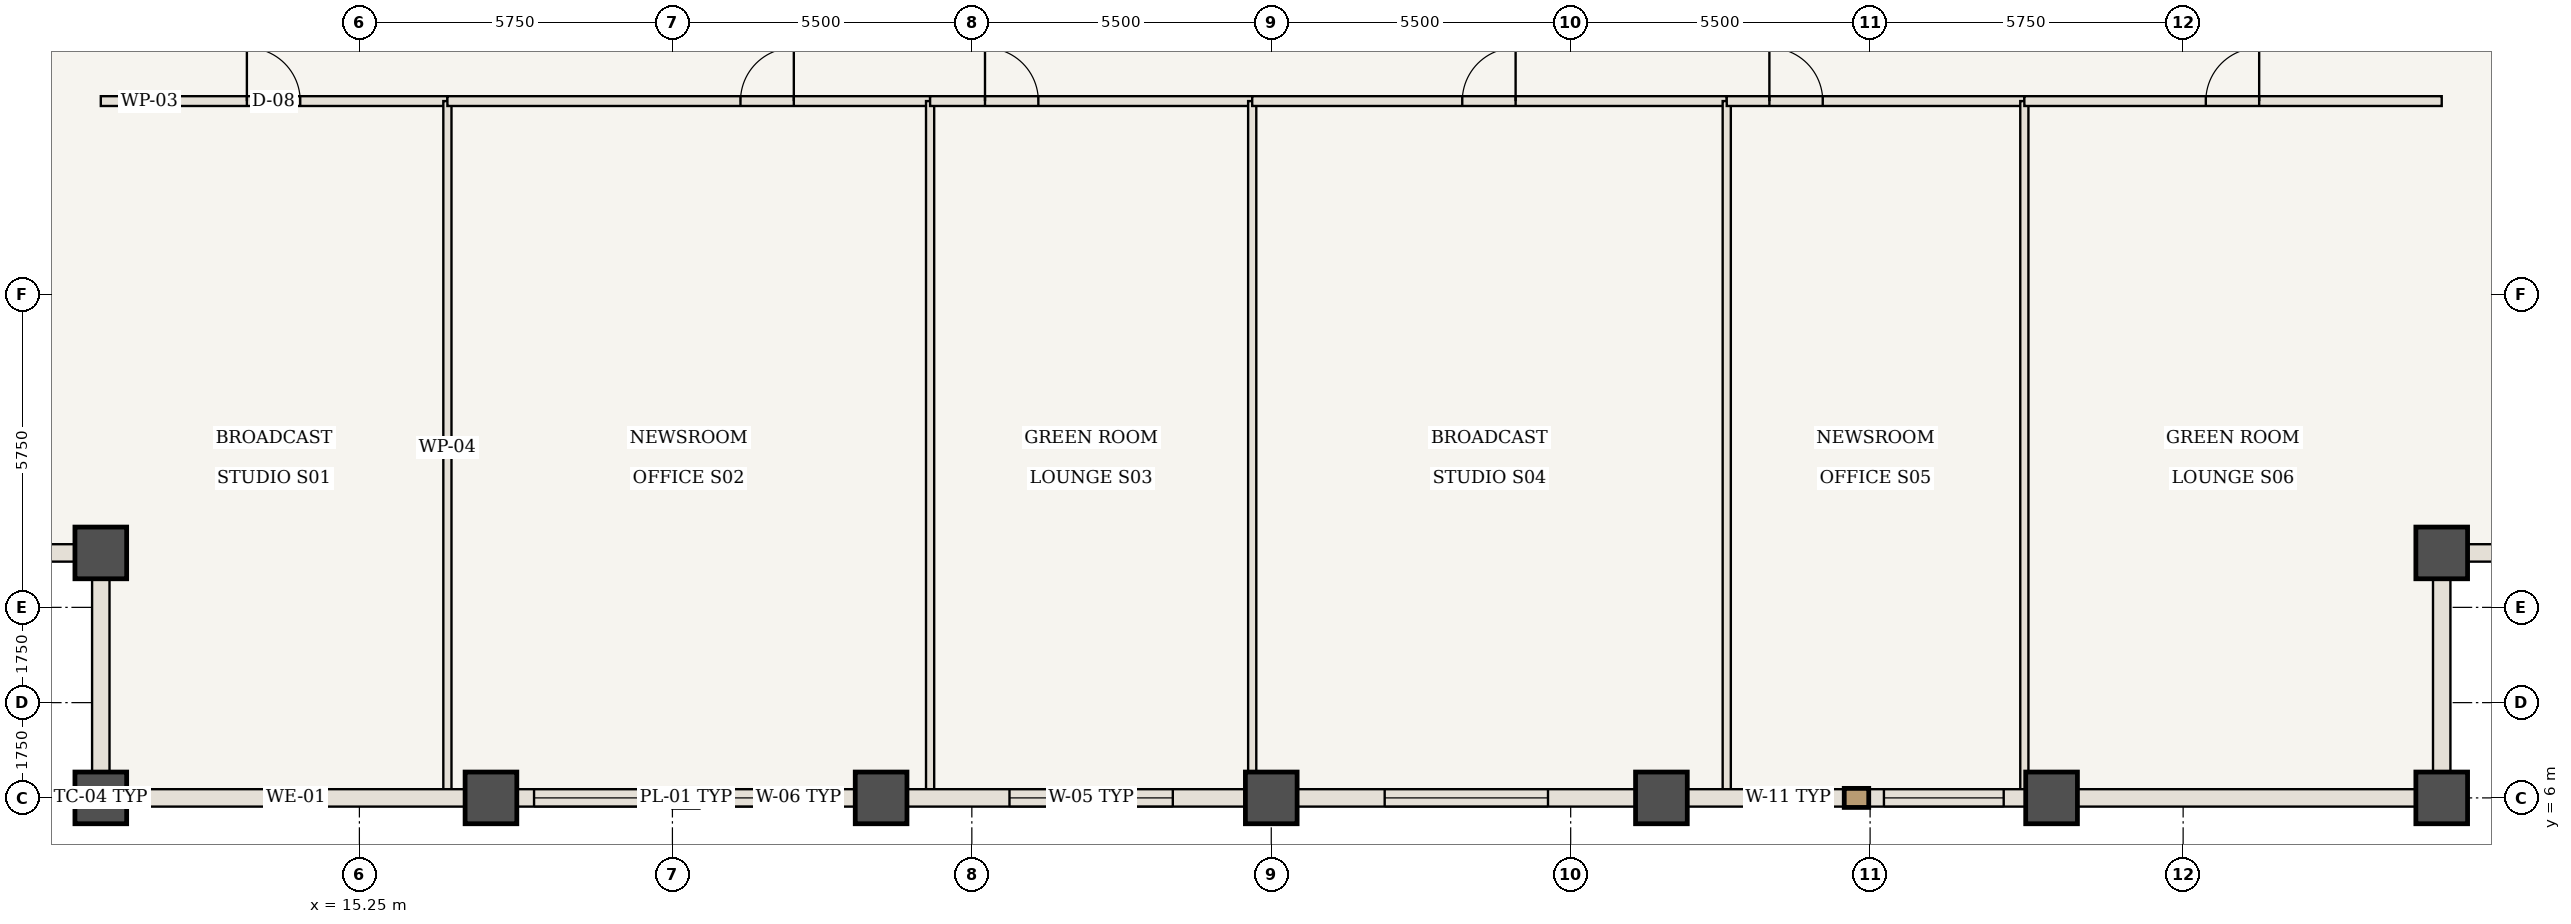
"""IFC4 building model, lengths in metres.
Left out: names, types, materials, properties, quantities, classifications, styles, units other than length and angle.
Written with IfcOpenShell. Run it as: python <this file> out.ifc"""

import sys

from ifc_helpers import new_model, si_unit, direction, frame, frame_2d, origin, origin_2d, place, context, subcontext, project, spatial, rectangle, extrude, element, fill, save


model = new_model("IFC4")
c1 = context("Model", 3, precision=1e-05, world=origin(), true_north=direction((0.0, 1.0)))
c2 = subcontext(c1, "Body", "Model", "MODEL_VIEW")
j1 = project(units=[si_unit("LENGTHUNIT", "METRE"), si_unit("PLANEANGLEUNIT", "RADIAN")], contexts=[c1])
p1 = place(None, origin())
s1 = spatial("IfcSite", under=j1, at=p1, CompositionType="ELEMENT")
p2 = place(p1, origin())
s2 = spatial("IfcBuilding", under=s1, at=p2, CompositionType="ELEMENT")
p3 = place(p2, frame((0.0, 0.0, 164.5)))
s3 = spatial("IfcBuildingStorey", under=s2, at=p3, CompositionType="ELEMENT", Elevation=164.5)
for number, where, z_axis, x_axis in (
    (1, (10.5, 6.0, 0.0), (0.0, 0.0, 1.0), (1.0, 0.0, 0.0)),
    (2, (10.5, 10.5, 0.0), (0.0, 0.0, 1.0), (1.0, 0.0, 0.0)),
    (3, (53.5, 6.0, 0.0), (0.0, 0.0, 1.0), (1.0, 0.0, 0.0)),
    (4, (53.5, 10.5, 0.0), (0.0, 0.0, 1.0), (1.0, 0.0, 0.0)),
    (5, (17.667, 6.0, 0.0), (0.0, 0.0, 1.0), (1.0, 0.0, 0.0)),
    (6, (24.833, 6.0, 0.0), (0.0, 0.0, 1.0), (1.0, 0.0, 0.0)),
    (7, (32.0, 6.0, 0.0), (0.0, 0.0, 1.0), (1.0, 0.0, 0.0)),
    (8, (39.167, 6.0, 0.0), (0.0, 0.0, 1.0), (1.0, 0.0, 0.0)),
    (9, (46.333, 6.0, 0.0), (0.0, 0.0, 1.0), (1.0, 0.0, 0.0)),
):
    element("IfcColumn", number, at=place(p3, frame(where, z_axis=z_axis, x_axis=x_axis)), inside=s3, PredefinedType="COLUMN", context=c2, shape_type="SweptSolid", body=[
        extrude(rectangle(XDim=0.95, YDim=0.95, at=origin_2d()), origin(), (0.0, 0.0, 1.0), 3.85),
    ])
p4 = place(p3, frame((10.5, 18.8, 0.0), z_axis=(0.0, 0.0, 1.0), x_axis=(1.0, 0.0, 0.0)))
e10 = element("IfcWall", 10, at=p4, inside=s3, PredefinedType="STANDARD", context=c2, shape_type="SweptSolid", body=[
    extrude(rectangle(XDim=6.367, YDim=0.18, at=frame_2d((3.183, 0.0))), origin(), (0.0, 0.0, 1.0), 3.685),
])
p5 = place(p4, frame((2.683, 0.0, 0.0)))
e11 = element("IfcOpeningElement", 11, at=p5, cuts=e10, PredefinedType="OPENING", context=c2, shape_type="SweptSolid", body=[
    extrude(rectangle(XDim=0.98, YDim=2.2, at=frame_2d((0.49, 1.1))), frame((0.0, 0.1, 0.0), z_axis=(0.0, -1.0, 0.0), x_axis=(1.0, 0.0, 0.0)), (0.0, 0.0, 1.0), 0.2),
])
p6 = place(p3, frame((16.867, 6.06, 0.0), z_axis=(0.0, 0.0, 1.0), x_axis=(0.0, 1.0, 0.0)))
e12 = element("IfcWall", 12, at=p6, inside=s3, PredefinedType="STANDARD", context=c2, shape_type="SweptSolid", body=[
    extrude(rectangle(XDim=12.74, YDim=0.15, at=frame_2d((6.37, 0.0))), origin(), (0.0, 0.0, 1.0), 3.685),
])
p7 = place(p3, frame((16.867, 18.8, 0.0), z_axis=(0.0, 0.0, 1.0), x_axis=(1.0, 0.0, 0.0)))
e13 = element("IfcWall", 13, at=p7, inside=s3, PredefinedType="STANDARD", context=c2, shape_type="SweptSolid", body=[
    extrude(rectangle(XDim=8.867, YDim=0.18, at=frame_2d((4.433, 0.0))), origin(), (0.0, 0.0, 1.0), 3.685),
])
p8 = place(p7, frame((5.383, 0.0, 0.0)))
e14 = element("IfcOpeningElement", 14, at=p8, cuts=e13, PredefinedType="OPENING", context=c2, shape_type="SweptSolid", body=[
    extrude(rectangle(XDim=0.98, YDim=2.2, at=frame_2d((0.49, 1.1))), frame((0.0, 0.1, 0.0), z_axis=(0.0, -1.0, 0.0), x_axis=(1.0, 0.0, 0.0)), (0.0, 0.0, 1.0), 0.2),
])
p9 = place(p3, frame((25.733, 6.06, 0.0), z_axis=(0.0, 0.0, 1.0), x_axis=(0.0, 1.0, 0.0)))
e15 = element("IfcWall", 15, at=p9, inside=s3, PredefinedType="STANDARD", context=c2, shape_type="SweptSolid", body=[
    extrude(rectangle(XDim=12.74, YDim=0.15, at=frame_2d((6.37, 0.0))), origin(), (0.0, 0.0, 1.0), 3.685),
])
p10 = place(p3, frame((25.733, 18.8, 0.0), z_axis=(0.0, 0.0, 1.0), x_axis=(1.0, 0.0, 0.0)))
e16 = element("IfcWall", 16, at=p10, inside=s3, PredefinedType="STANDARD", context=c2, shape_type="SweptSolid", body=[
    extrude(rectangle(XDim=5.917, YDim=0.18, at=frame_2d((2.958, 0.0))), origin(), (0.0, 0.0, 1.0), 3.685),
])
p11 = place(p10, frame((1.008, 0.0, 0.0)))
e17 = element("IfcOpeningElement", 17, at=p11, cuts=e16, PredefinedType="OPENING", context=c2, shape_type="SweptSolid", body=[
    extrude(rectangle(XDim=0.98, YDim=2.2, at=frame_2d((0.49, 1.1))), frame((0.0, 0.1, 0.0), z_axis=(0.0, -1.0, 0.0), x_axis=(1.0, 0.0, 0.0)), (0.0, 0.0, 1.0), 0.2),
])
p12 = place(p3, frame((31.65, 6.06, 0.0), z_axis=(0.0, 0.0, 1.0), x_axis=(0.0, 1.0, 0.0)))
e18 = element("IfcWall", 18, at=p12, inside=s3, PredefinedType="STANDARD", context=c2, shape_type="SweptSolid", body=[
    extrude(rectangle(XDim=12.74, YDim=0.15, at=frame_2d((6.37, 0.0))), origin(), (0.0, 0.0, 1.0), 3.685),
])
p13 = place(p3, frame((31.65, 18.8, 0.0), z_axis=(0.0, 0.0, 1.0), x_axis=(1.0, 0.0, 0.0)))
e19 = element("IfcWall", 19, at=p13, inside=s3, PredefinedType="STANDARD", context=c2, shape_type="SweptSolid", body=[
    extrude(rectangle(XDim=8.717, YDim=0.18, at=frame_2d((4.358, 0.0))), origin(), (0.0, 0.0, 1.0), 3.685),
])
p14 = place(p13, frame((3.858, 0.0, 0.0)))
e20 = element("IfcOpeningElement", 20, at=p14, cuts=e19, PredefinedType="OPENING", context=c2, shape_type="SweptSolid", body=[
    extrude(rectangle(XDim=0.98, YDim=2.2, at=frame_2d((0.49, 1.1))), frame((0.0, 0.1, 0.0), z_axis=(0.0, -1.0, 0.0), x_axis=(1.0, 0.0, 0.0)), (0.0, 0.0, 1.0), 0.2),
])
p15 = place(p3, frame((40.367, 6.06, 0.0), z_axis=(0.0, 0.0, 1.0), x_axis=(0.0, 1.0, 0.0)))
e21 = element("IfcWall", 21, at=p15, inside=s3, PredefinedType="STANDARD", context=c2, shape_type="SweptSolid", body=[
    extrude(rectangle(XDim=12.74, YDim=0.15, at=frame_2d((6.37, 0.0))), origin(), (0.0, 0.0, 1.0), 3.685),
])
p16 = place(p3, frame((40.367, 18.8, 0.0), z_axis=(0.0, 0.0, 1.0), x_axis=(1.0, 0.0, 0.0)))
e22 = element("IfcWall", 22, at=p16, inside=s3, PredefinedType="STANDARD", context=c2, shape_type="SweptSolid", body=[
    extrude(rectangle(XDim=5.467, YDim=0.18, at=frame_2d((2.733, 0.0))), origin(), (0.0, 0.0, 1.0), 3.685),
])
p17 = place(p16, frame((0.783, 0.0, 0.0)))
e23 = element("IfcOpeningElement", 23, at=p17, cuts=e22, PredefinedType="OPENING", context=c2, shape_type="SweptSolid", body=[
    extrude(rectangle(XDim=0.98, YDim=2.2, at=frame_2d((0.49, 1.1))), frame((0.0, 0.1, 0.0), z_axis=(0.0, -1.0, 0.0), x_axis=(1.0, 0.0, 0.0)), (0.0, 0.0, 1.0), 0.2),
])
p18 = place(p3, frame((45.833, 6.06, 0.0), z_axis=(0.0, 0.0, 1.0), x_axis=(0.0, 1.0, 0.0)))
e24 = element("IfcWall", 24, at=p18, inside=s3, PredefinedType="STANDARD", context=c2, shape_type="SweptSolid", body=[
    extrude(rectangle(XDim=12.74, YDim=0.15, at=frame_2d((6.37, 0.0))), origin(), (0.0, 0.0, 1.0), 3.685),
])
p19 = place(p3, frame((45.833, 18.8, 0.0), z_axis=(0.0, 0.0, 1.0), x_axis=(1.0, 0.0, 0.0)))
e25 = element("IfcWall", 25, at=p19, inside=s3, PredefinedType="STANDARD", context=c2, shape_type="SweptSolid", body=[
    extrude(rectangle(XDim=7.667, YDim=0.18, at=frame_2d((3.833, 0.0))), origin(), (0.0, 0.0, 1.0), 3.685),
])
p20 = place(p19, frame((3.333, 0.0, 0.0)))
e26 = element("IfcOpeningElement", 26, at=p20, cuts=e25, PredefinedType="OPENING", context=c2, shape_type="SweptSolid", body=[
    extrude(rectangle(XDim=0.98, YDim=2.2, at=frame_2d((0.49, 1.1))), frame((0.0, 0.1, 0.0), z_axis=(0.0, -1.0, 0.0), x_axis=(1.0, 0.0, 0.0)), (0.0, 0.0, 1.0), 0.2),
])
p21 = place(p3, frame((17.667, 6.0, 0.0), z_axis=(0.0, 0.0, 1.0), x_axis=(-1.0, 0.0, 0.0)))
e27 = element("IfcWall", 27, at=p21, inside=s3, PredefinedType="USERDEFINED", context=c2, shape_type="SweptSolid", body=[
    extrude(rectangle(XDim=7.167, YDim=0.32, at=frame_2d((3.583, 0.0))), origin(), (0.0, 0.0, 1.0), 2.885),
])
p22 = place(p3, frame((24.833, 6.0, 0.0), z_axis=(0.0, 0.0, 1.0), x_axis=(-1.0, 0.0, 0.0)))
e28 = element("IfcWall", 28, at=p22, inside=s3, PredefinedType="USERDEFINED", context=c2, shape_type="SweptSolid", body=[
    extrude(rectangle(XDim=7.167, YDim=0.32, at=frame_2d((3.583, 0.0))), origin(), (0.0, 0.0, 1.0), 2.885),
])
p23 = place(p22, frame((0.792, 0.0, 0.85)))
e29 = element("IfcOpeningElement", 29, at=p23, cuts=e28, PredefinedType="OPENING", context=c2, shape_type="SweptSolid", body=[
    extrude(rectangle(XDim=2.2, YDim=1.835, at=frame_2d((1.1, 0.917))), frame((0.0, 0.17, 0.0), z_axis=(0.0, -1.0, 0.0), x_axis=(1.0, 0.0, 0.0)), (0.0, 0.0, 1.0), 0.34),
])
p24 = place(p22, frame((4.175, 0.0, 0.85)))
e30 = element("IfcOpeningElement", 30, at=p24, cuts=e28, PredefinedType="OPENING", context=c2, shape_type="SweptSolid", body=[
    extrude(rectangle(XDim=2.2, YDim=1.835, at=frame_2d((1.1, 0.917))), frame((0.0, 0.17, 0.0), z_axis=(0.0, -1.0, 0.0), x_axis=(1.0, 0.0, 0.0)), (0.0, 0.0, 1.0), 0.34),
])
p25 = place(p3, frame((32.0, 6.0, 0.0), z_axis=(0.0, 0.0, 1.0), x_axis=(-1.0, 0.0, 0.0)))
e31 = element("IfcWall", 31, at=p25, inside=s3, PredefinedType="USERDEFINED", context=c2, shape_type="SweptSolid", body=[
    extrude(rectangle(XDim=7.167, YDim=0.32, at=frame_2d((3.583, 0.0))), origin(), (0.0, 0.0, 1.0), 2.885),
])
p26 = place(p25, frame((1.808, 0.0, 0.85)))
e32 = element("IfcOpeningElement", 32, at=p26, cuts=e31, PredefinedType="OPENING", context=c2, shape_type="SweptSolid", body=[
    extrude(rectangle(XDim=3.0, YDim=1.835, at=frame_2d((1.5, 0.917))), frame((0.0, 0.17, 0.0), z_axis=(0.0, -1.0, 0.0), x_axis=(1.0, 0.0, 0.0)), (0.0, 0.0, 1.0), 0.34),
])
p27 = place(p3, frame((39.167, 6.0, 0.0), z_axis=(0.0, 0.0, 1.0), x_axis=(-1.0, 0.0, 0.0)))
e33 = element("IfcWall", 33, at=p27, inside=s3, PredefinedType="USERDEFINED", context=c2, shape_type="SweptSolid", body=[
    extrude(rectangle(XDim=7.167, YDim=0.32, at=frame_2d((3.583, 0.0))), origin(), (0.0, 0.0, 1.0), 2.885),
])
p28 = place(p27, frame((2.083, 0.0, 0.85)))
e34 = element("IfcOpeningElement", 34, at=p28, cuts=e33, PredefinedType="OPENING", context=c2, shape_type="SweptSolid", body=[
    extrude(rectangle(XDim=3.0, YDim=1.835, at=frame_2d((1.5, 0.917))), frame((0.0, 0.17, 0.0), z_axis=(0.0, -1.0, 0.0), x_axis=(1.0, 0.0, 0.0)), (0.0, 0.0, 1.0), 0.34),
])
p29 = place(p3, frame((46.333, 6.0, 0.0), z_axis=(0.0, 0.0, 1.0), x_axis=(-1.0, 0.0, 0.0)))
e35 = element("IfcWall", 35, at=p29, inside=s3, PredefinedType="USERDEFINED", context=c2, shape_type="SweptSolid", body=[
    extrude(rectangle(XDim=7.167, YDim=0.32, at=frame_2d((3.583, 0.0))), origin(), (0.0, 0.0, 1.0), 2.885),
])
p30 = place(p29, frame((0.879, 0.0, 0.85)))
e36 = element("IfcOpeningElement", 36, at=p30, cuts=e35, PredefinedType="OPENING", context=c2, shape_type="SweptSolid", body=[
    extrude(rectangle(XDim=2.2, YDim=1.835, at=frame_2d((1.1, 0.917))), frame((0.0, 0.17, 0.0), z_axis=(0.0, -1.0, 0.0), x_axis=(1.0, 0.0, 0.0)), (0.0, 0.0, 1.0), 0.34),
])
p31 = place(p29, frame((4.038, 0.0, 0.85)))
e37 = element("IfcOpeningElement", 37, at=p31, cuts=e35, PredefinedType="OPENING", context=c2, shape_type="SweptSolid", body=[
    extrude(rectangle(XDim=1.6, YDim=1.835, at=frame_2d((0.8, 0.917))), frame((0.0, 0.17, 0.0), z_axis=(0.0, -1.0, 0.0), x_axis=(1.0, 0.0, 0.0)), (0.0, 0.0, 1.0), 0.34),
])
p32 = place(p3, frame((53.5, 6.0, 0.0), z_axis=(0.0, 0.0, 1.0), x_axis=(-1.0, 0.0, 0.0)))
e38 = element("IfcWall", 38, at=p32, inside=s3, PredefinedType="USERDEFINED", context=c2, shape_type="SweptSolid", body=[
    extrude(rectangle(XDim=7.167, YDim=0.32, at=frame_2d((3.583, 0.0))), origin(), (0.0, 0.0, 1.0), 2.885),
])
for number, where, z_axis, x_axis in (
    (39, (10.5, 6.0, 0.0), (0.0, 0.0, 1.0), (0.0, 1.0, 0.0)),
    (40, (10.5, 10.5, 0.0), (0.0, 0.0, 1.0), (-1.0, 0.0, 0.0)),
    (41, (53.5, 10.5, 0.0), (0.0, 0.0, 1.0), (0.0, -1.0, 0.0)),
    (42, (58.0, 10.5, 0.0), (0.0, 0.0, 1.0), (-1.0, 0.0, 0.0)),
):
    element("IfcWall", number, at=place(p3, frame(where, z_axis=z_axis, x_axis=x_axis)), inside=s3, PredefinedType="USERDEFINED", context=c2, shape_type="SweptSolid", body=[
        extrude(rectangle(XDim=4.5, YDim=0.32, at=frame_2d((2.25, 0.0))), origin(), (0.0, 0.0, 1.0), 2.885),
    ])
p33 = place(p5, origin())
e43 = element("IfcDoor", 43, at=p33, inside=s3, OperationType="SINGLE_SWING_LEFT", PredefinedType="DOOR", context=c2, shape_type="SweptSolid", body=[
    extrude(rectangle(XDim=0.98, YDim=2.2, at=frame_2d((0.49, 1.1))), frame((0.0, 0.025, 0.0), z_axis=(0.0, -1.0, 0.0), x_axis=(1.0, 0.0, 0.0)), (0.0, 0.0, 1.0), 0.05),
])
fill(e11, e43)
p34 = place(p8, origin())
e44 = element("IfcDoor", 44, at=p34, inside=s3, OperationType="SINGLE_SWING_RIGHT", PredefinedType="DOOR", context=c2, shape_type="SweptSolid", body=[
    extrude(rectangle(XDim=0.98, YDim=2.2, at=frame_2d((0.49, 1.1))), frame((0.0, 0.025, 0.0), z_axis=(0.0, -1.0, 0.0), x_axis=(1.0, 0.0, 0.0)), (0.0, 0.0, 1.0), 0.05),
])
fill(e14, e44)
p35 = place(p11, origin())
e45 = element("IfcDoor", 45, at=p35, inside=s3, OperationType="SINGLE_SWING_LEFT", PredefinedType="DOOR", context=c2, shape_type="SweptSolid", body=[
    extrude(rectangle(XDim=0.98, YDim=2.2, at=frame_2d((0.49, 1.1))), frame((0.0, 0.025, 0.0), z_axis=(0.0, -1.0, 0.0), x_axis=(1.0, 0.0, 0.0)), (0.0, 0.0, 1.0), 0.05),
])
fill(e17, e45)
p36 = place(p14, origin())
e46 = element("IfcDoor", 46, at=p36, inside=s3, OperationType="SINGLE_SWING_RIGHT", PredefinedType="DOOR", context=c2, shape_type="SweptSolid", body=[
    extrude(rectangle(XDim=0.98, YDim=2.2, at=frame_2d((0.49, 1.1))), frame((0.0, 0.025, 0.0), z_axis=(0.0, -1.0, 0.0), x_axis=(1.0, 0.0, 0.0)), (0.0, 0.0, 1.0), 0.05),
])
fill(e20, e46)
p37 = place(p17, origin())
e47 = element("IfcDoor", 47, at=p37, inside=s3, OperationType="SINGLE_SWING_LEFT", PredefinedType="DOOR", context=c2, shape_type="SweptSolid", body=[
    extrude(rectangle(XDim=0.98, YDim=2.2, at=frame_2d((0.49, 1.1))), frame((0.0, 0.025, 0.0), z_axis=(0.0, -1.0, 0.0), x_axis=(1.0, 0.0, 0.0)), (0.0, 0.0, 1.0), 0.05),
])
fill(e23, e47)
p38 = place(p20, origin())
e48 = element("IfcDoor", 48, at=p38, inside=s3, OperationType="SINGLE_SWING_RIGHT", PredefinedType="DOOR", context=c2, shape_type="SweptSolid", body=[
    extrude(rectangle(XDim=0.98, YDim=2.2, at=frame_2d((0.49, 1.1))), frame((0.0, 0.025, 0.0), z_axis=(0.0, -1.0, 0.0), x_axis=(1.0, 0.0, 0.0)), (0.0, 0.0, 1.0), 0.05),
])
fill(e26, e48)
p39 = place(p23, origin())
e49 = element("IfcWindow", 49, at=p39, inside=s3, PartitioningType="SINGLE_PANEL", PredefinedType="WINDOW", context=c2, shape_type="SweptSolid", body=[
    extrude(rectangle(XDim=2.2, YDim=1.835, at=frame_2d((1.1, 0.917))), frame((0.0, 0.03, 0.0), z_axis=(0.0, -1.0, 0.0), x_axis=(1.0, 0.0, 0.0)), (0.0, 0.0, 1.0), 0.06),
])
fill(e29, e49)
p40 = place(p24, origin())
e50 = element("IfcWindow", 50, at=p40, inside=s3, PartitioningType="SINGLE_PANEL", PredefinedType="WINDOW", context=c2, shape_type="SweptSolid", body=[
    extrude(rectangle(XDim=2.2, YDim=1.835, at=frame_2d((1.1, 0.917))), frame((0.0, 0.03, 0.0), z_axis=(0.0, -1.0, 0.0), x_axis=(1.0, 0.0, 0.0)), (0.0, 0.0, 1.0), 0.06),
])
fill(e30, e50)
p41 = place(p26, origin())
e51 = element("IfcWindow", 51, at=p41, inside=s3, PartitioningType="SINGLE_PANEL", PredefinedType="WINDOW", context=c2, shape_type="SweptSolid", body=[
    extrude(rectangle(XDim=3.0, YDim=1.835, at=frame_2d((1.5, 0.917))), frame((0.0, 0.03, 0.0), z_axis=(0.0, -1.0, 0.0), x_axis=(1.0, 0.0, 0.0)), (0.0, 0.0, 1.0), 0.06),
])
fill(e32, e51)
p42 = place(p28, origin())
e52 = element("IfcWindow", 52, at=p42, inside=s3, PartitioningType="SINGLE_PANEL", PredefinedType="WINDOW", context=c2, shape_type="SweptSolid", body=[
    extrude(rectangle(XDim=3.0, YDim=1.835, at=frame_2d((1.5, 0.917))), frame((0.0, 0.03, 0.0), z_axis=(0.0, -1.0, 0.0), x_axis=(1.0, 0.0, 0.0)), (0.0, 0.0, 1.0), 0.06),
])
fill(e34, e52)
p43 = place(p30, origin())
e53 = element("IfcWindow", 53, at=p43, inside=s3, PartitioningType="SINGLE_PANEL", PredefinedType="WINDOW", context=c2, shape_type="SweptSolid", body=[
    extrude(rectangle(XDim=2.2, YDim=1.835, at=frame_2d((1.1, 0.917))), frame((0.0, 0.03, 0.0), z_axis=(0.0, -1.0, 0.0), x_axis=(1.0, 0.0, 0.0)), (0.0, 0.0, 1.0), 0.06),
])
fill(e36, e53)
p44 = place(p31, origin())
e54 = element("IfcWindow", 54, at=p44, inside=s3, PartitioningType="SINGLE_PANEL", PredefinedType="WINDOW", context=c2, shape_type="SweptSolid", body=[
    extrude(rectangle(XDim=1.6, YDim=1.835, at=frame_2d((0.8, 0.917))), frame((0.0, 0.03, 0.0), z_axis=(0.0, -1.0, 0.0), x_axis=(1.0, 0.0, 0.0)), (0.0, 0.0, 1.0), 0.06),
])
fill(e37, e54)
save(model, sys.argv[1])
